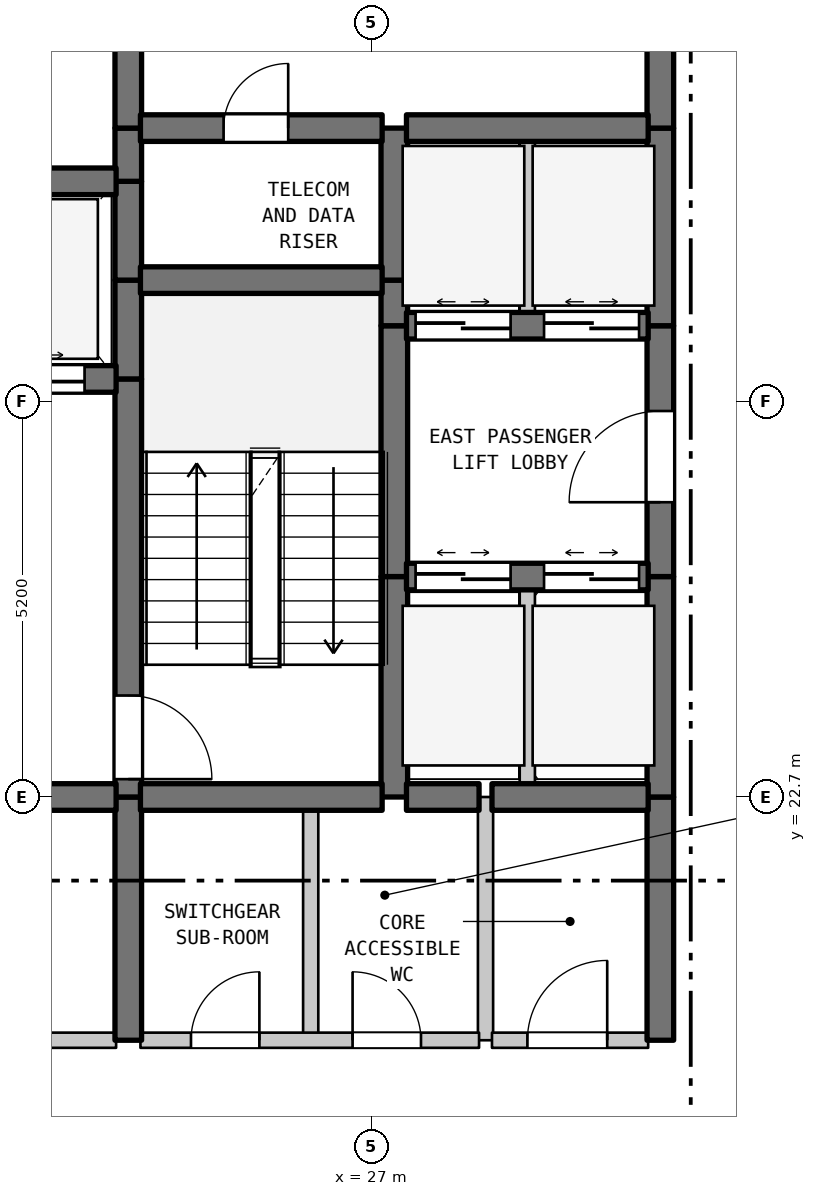
"""IFC4 building model, lengths in metres.
Left out: names, types, materials, properties, quantities, classifications, styles, units other than length and angle.
Written with IfcOpenShell. Run it as: python <this file> out.ifc"""

import sys

from ifc_helpers import new_model, si_unit, direction, frame, frame_2d, origin, place, context, subcontext, project, spatial, rectangle, extrude, element, fill, save


model = new_model("IFC4")
c1 = context("Model", 3, precision=1e-05, world=origin(), true_north=direction((0.0, 1.0)))
c2 = subcontext(c1, "Body", "Model", "MODEL_VIEW")
j1 = project(units=[si_unit("LENGTHUNIT", "METRE"), si_unit("PLANEANGLEUNIT", "RADIAN")], contexts=[c1])
p1 = place(None, origin())
s1 = spatial("IfcSite", under=j1, at=p1, CompositionType="ELEMENT")
p2 = place(p1, origin())
s2 = spatial("IfcBuilding", under=s1, at=p2, CompositionType="ELEMENT")
p3 = place(p2, frame((0.0, 0.0, 203.2)))
s3 = spatial("IfcBuildingStorey", under=s2, at=p3, CompositionType="ELEMENT", Elevation=203.2)
p4 = place(p3, frame((23.8, 19.5, 0.0), z_axis=(0.0, 0.0, 1.0), x_axis=(0.0, 1.0, 0.0)))
e1 = element("IfcWall", 1, at=p4, inside=s3, PredefinedType="SHEAR", context=c2, shape_type="SweptSolid", body=[
    extrude(rectangle(XDim=3.2, YDim=0.35, at=frame_2d((1.6, 0.0))), origin(), (0.0, 0.0, 1.0), 3.39),
])
p5 = place(p3, frame((23.8, 22.7, 0.0), z_axis=(0.0, 0.0, 1.0), x_axis=(0.0, 1.0, 0.0)))
e2 = element("IfcWall", 2, at=p5, inside=s3, PredefinedType="SHEAR", context=c2, shape_type="SweptSolid", body=[
    extrude(rectangle(XDim=5.5, YDim=0.35, at=frame_2d((2.75, 0.0))), origin(), (0.0, 0.0, 1.0), 3.39),
])
p6 = place(p5, frame((0.235, 0.0, 0.0)))
e3 = element("IfcOpeningElement", 3, at=p6, cuts=e2, PredefinedType="OPENING", context=c2, shape_type="SweptSolid", body=[
    extrude(rectangle(XDim=1.1, YDim=2.15, at=frame_2d((0.55, 1.075))), frame((0.0, 0.185, 0.0), z_axis=(0.0, -1.0, 0.0), x_axis=(1.0, 0.0, 0.0)), (0.0, 0.0, 1.0), 0.37),
])
for number, where, z_axis, x_axis in (
    (4, (23.8, 28.2, 0.0), (0.0, 0.0, 1.0), (0.0, 1.0, 0.0)),
    (5, (23.8, 29.5, 0.0), (0.0, 0.0, 1.0), (0.0, 1.0, 0.0)),
):
    element("IfcWall", number, at=place(p3, frame(where, z_axis=z_axis, x_axis=x_axis)), inside=s3, PredefinedType="SHEAR", context=c2, shape_type="SweptSolid", body=[
        extrude(rectangle(XDim=1.3, YDim=0.35, at=frame_2d((0.65, 0.0))), origin(), (0.0, 0.0, 1.0), 3.39),
    ])
p7 = place(p3, frame((23.8, 30.8, 0.0), z_axis=(0.0, 0.0, 1.0), x_axis=(0.0, 1.0, 0.0)))
e6 = element("IfcWall", 6, at=p7, inside=s3, PredefinedType="SHEAR", context=c2, shape_type="SweptSolid", body=[
    extrude(rectangle(XDim=0.7, YDim=0.35, at=frame_2d((0.35, 0.0))), origin(), (0.0, 0.0, 1.0), 3.39),
])
p8 = place(p3, frame((23.8, 31.5, 0.0), z_axis=(0.0, 0.0, 1.0), x_axis=(0.0, 1.0, 0.0)))
e7 = element("IfcWall", 7, at=p8, inside=s3, PredefinedType="SHEAR", context=c2, shape_type="SweptSolid", body=[
    extrude(rectangle(XDim=3.5, YDim=0.35, at=frame_2d((1.75, 0.0))), origin(), (0.0, 0.0, 1.0), 3.39),
])
p9 = place(p8, frame((1.127, 0.0, 0.0)))
e8 = element("IfcOpeningElement", 8, at=p9, cuts=e7, PredefinedType="OPENING", context=c2, shape_type="SweptSolid", body=[
    extrude(rectangle(XDim=1.1, YDim=2.15, at=frame_2d((0.55, 1.075))), frame((0.0, 0.185, 0.0), z_axis=(0.0, -1.0, 0.0), x_axis=(1.0, 0.0, 0.0)), (0.0, 0.0, 1.0), 0.37),
])
p10 = place(p3, frame((26.2, 19.5, 0.0), z_axis=(0.0, 0.0, 1.0), x_axis=(0.0, 1.0, 0.0)))
e9 = element("IfcWall", 9, at=p10, inside=s3, PredefinedType="STANDARD", context=c2, shape_type="SweptSolid", body=[
    extrude(rectangle(XDim=3.2, YDim=0.2, at=frame_2d((1.6, 0.0))), origin(), (0.0, 0.0, 1.0), 3.39),
])
p11 = place(p3, frame((27.3, 22.7, 0.0), z_axis=(0.0, 0.0, 1.0), x_axis=(0.0, 1.0, 0.0)))
e10 = element("IfcWall", 10, at=p11, inside=s3, PredefinedType="SHEAR", context=c2, shape_type="SweptSolid", body=[
    extrude(rectangle(XDim=2.9, YDim=0.35, at=frame_2d((1.45, 0.0))), origin(), (0.0, 0.0, 1.0), 3.39),
])
p12 = place(p3, frame((27.3, 25.6, 0.0), z_axis=(0.0, 0.0, 1.0), x_axis=(0.0, 1.0, 0.0)))
e11 = element("IfcWall", 11, at=p12, inside=s3, PredefinedType="SHEAR", context=c2, shape_type="SweptSolid", body=[
    extrude(rectangle(XDim=3.3, YDim=0.35, at=frame_2d((1.65, 0.0))), origin(), (0.0, 0.0, 1.0), 3.39),
])
p13 = place(p3, frame((27.3, 28.9, 0.0), z_axis=(0.0, 0.0, 1.0), x_axis=(0.0, 1.0, 0.0)))
e12 = element("IfcWall", 12, at=p13, inside=s3, PredefinedType="SHEAR", context=c2, shape_type="SweptSolid", body=[
    extrude(rectangle(XDim=0.6, YDim=0.35, at=frame_2d((0.3, 0.0))), origin(), (0.0, 0.0, 1.0), 3.39),
])
p14 = place(p3, frame((27.3, 29.5, 0.0), z_axis=(0.0, 0.0, 1.0), x_axis=(0.0, 1.0, 0.0)))
e13 = element("IfcWall", 13, at=p14, inside=s3, PredefinedType="SHEAR", context=c2, shape_type="SweptSolid", body=[
    extrude(rectangle(XDim=2.0, YDim=0.35, at=frame_2d((1.0, 0.0))), origin(), (0.0, 0.0, 1.0), 3.39),
])
p15 = place(p3, frame((28.5, 19.5, 0.0), z_axis=(0.0, 0.0, 1.0), x_axis=(0.0, 1.0, 0.0)))
e14 = element("IfcWall", 14, at=p15, inside=s3, PredefinedType="STANDARD", context=c2, shape_type="SweptSolid", body=[
    extrude(rectangle(XDim=3.2, YDim=0.2, at=frame_2d((1.6, 0.0))), origin(), (0.0, 0.0, 1.0), 3.39),
])
p16 = place(p3, frame((29.05, 22.7, 0.0), z_axis=(0.0, 0.0, 1.0), x_axis=(0.0, 1.0, 0.0)))
e15 = element("IfcWall", 15, at=p16, inside=s3, PredefinedType="STANDARD", context=c2, shape_type="SweptSolid", body=[
    extrude(rectangle(XDim=2.9, YDim=0.2, at=frame_2d((1.45, 0.0))), origin(), (0.0, 0.0, 1.0), 3.39),
])
p17 = place(p3, frame((29.05, 28.9, 0.0), z_axis=(0.0, 0.0, 1.0), x_axis=(0.0, 1.0, 0.0)))
e16 = element("IfcWall", 16, at=p17, inside=s3, PredefinedType="STANDARD", context=c2, shape_type="SweptSolid", body=[
    extrude(rectangle(XDim=2.6, YDim=0.2, at=frame_2d((1.3, 0.0))), origin(), (0.0, 0.0, 1.0), 3.39),
])
p18 = place(p3, frame((30.8, 19.5, 0.0), z_axis=(0.0, 0.0, 1.0), x_axis=(0.0, 1.0, 0.0)))
e17 = element("IfcWall", 17, at=p18, inside=s3, PredefinedType="SHEAR", context=c2, shape_type="SweptSolid", body=[
    extrude(rectangle(XDim=3.2, YDim=0.35, at=frame_2d((1.6, 0.0))), origin(), (0.0, 0.0, 1.0), 3.39),
])
p19 = place(p3, frame((30.8, 22.7, 0.0), z_axis=(0.0, 0.0, 1.0), x_axis=(0.0, 1.0, 0.0)))
e18 = element("IfcWall", 18, at=p19, inside=s3, PredefinedType="SHEAR", context=c2, shape_type="SweptSolid", body=[
    extrude(rectangle(XDim=2.9, YDim=0.35, at=frame_2d((1.45, 0.0))), origin(), (0.0, 0.0, 1.0), 3.39),
])
p20 = place(p3, frame((30.8, 25.6, 0.0), z_axis=(0.0, 0.0, 1.0), x_axis=(0.0, 1.0, 0.0)))
e19 = element("IfcWall", 19, at=p20, inside=s3, PredefinedType="SHEAR", context=c2, shape_type="SweptSolid", body=[
    extrude(rectangle(XDim=3.3, YDim=0.35, at=frame_2d((1.65, 0.0))), origin(), (0.0, 0.0, 1.0), 3.39),
])
p21 = place(p20, frame((0.978, 0.0, 0.0)))
e20 = element("IfcOpeningElement", 20, at=p21, cuts=e19, PredefinedType="OPENING", context=c2, shape_type="SweptSolid", body=[
    extrude(rectangle(XDim=1.2, YDim=2.2, at=frame_2d((0.6, 1.1))), frame((0.0, 0.185, 0.0), z_axis=(0.0, -1.0, 0.0), x_axis=(1.0, 0.0, 0.0)), (0.0, 0.0, 1.0), 0.37),
])
p22 = place(p3, frame((30.8, 28.9, 0.0), z_axis=(0.0, 0.0, 1.0), x_axis=(0.0, 1.0, 0.0)))
e21 = element("IfcWall", 21, at=p22, inside=s3, PredefinedType="SHEAR", context=c2, shape_type="SweptSolid", body=[
    extrude(rectangle(XDim=2.6, YDim=0.35, at=frame_2d((1.3, 0.0))), origin(), (0.0, 0.0, 1.0), 3.39),
])
p23 = place(p3, frame((30.8, 31.5, 0.0), z_axis=(0.0, 0.0, 1.0), x_axis=(0.0, 1.0, 0.0)))
e22 = element("IfcWall", 22, at=p23, inside=s3, PredefinedType="SHEAR", context=c2, shape_type="SweptSolid", body=[
    extrude(rectangle(XDim=3.5, YDim=0.35, at=frame_2d((1.75, 0.0))), origin(), (0.0, 0.0, 1.0), 3.39),
])
p24 = place(p23, frame((1.15, 0.0, 0.0)))
e23 = element("IfcOpeningElement", 23, at=p24, cuts=e22, PredefinedType="OPENING", context=c2, shape_type="SweptSolid", body=[
    extrude(rectangle(XDim=1.2, YDim=2.2, at=frame_2d((0.6, 1.1))), frame((0.0, 0.185, 0.0), z_axis=(0.0, -1.0, 0.0), x_axis=(1.0, 0.0, 0.0)), (0.0, 0.0, 1.0), 0.37),
])
p25 = place(p3, frame((19.16, 19.5, 0.0), z_axis=(0.0, 0.0, 1.0), x_axis=(1.0, 0.0, 0.0)))
e24 = element("IfcWall", 24, at=p25, inside=s3, PredefinedType="STANDARD", context=c2, shape_type="SweptSolid", body=[
    extrude(rectangle(XDim=4.48, YDim=0.2, at=frame_2d((2.24, 0.0))), origin(), (0.0, 0.0, 1.0), 3.39),
])
p26 = place(p25, frame((1.64, 0.0, 0.0)))
e25 = element("IfcOpeningElement", 25, at=p26, cuts=e24, PredefinedType="OPENING", context=c2, shape_type="SweptSolid", body=[
    extrude(rectangle(XDim=1.2, YDim=2.2, at=frame_2d((0.6, 1.1))), frame((0.0, 0.11, 0.0), z_axis=(0.0, -1.0, 0.0), x_axis=(1.0, 0.0, 0.0)), (0.0, 0.0, 1.0), 0.22),
])
p27 = place(p3, frame((23.96, 19.5, 0.0), z_axis=(0.0, 0.0, 1.0), x_axis=(1.0, 0.0, 0.0)))
e26 = element("IfcWall", 26, at=p27, inside=s3, PredefinedType="STANDARD", context=c2, shape_type="SweptSolid", body=[
    extrude(rectangle(XDim=4.455, YDim=0.2, at=frame_2d((2.228, 0.0))), origin(), (0.0, 0.0, 1.0), 3.39),
])
p28 = place(p27, frame((0.665, 0.0, 0.0)))
e27 = element("IfcOpeningElement", 27, at=p28, cuts=e26, PredefinedType="OPENING", context=c2, shape_type="SweptSolid", body=[
    extrude(rectangle(XDim=0.9, YDim=2.15, at=frame_2d((0.45, 1.075))), frame((0.0, 0.11, 0.0), z_axis=(0.0, -1.0, 0.0), x_axis=(1.0, 0.0, 0.0)), (0.0, 0.0, 1.0), 0.22),
])
p29 = place(p27, frame((2.791, 0.0, 0.0)))
e28 = element("IfcOpeningElement", 28, at=p29, cuts=e26, PredefinedType="OPENING", context=c2, shape_type="SweptSolid", body=[
    extrude(rectangle(XDim=0.9, YDim=2.15, at=frame_2d((0.45, 1.075))), frame((0.0, 0.11, 0.0), z_axis=(0.0, -1.0, 0.0), x_axis=(1.0, 0.0, 0.0)), (0.0, 0.0, 1.0), 0.22),
])
p30 = place(p3, frame((28.585, 19.5, 0.0), z_axis=(0.0, 0.0, 1.0), x_axis=(1.0, 0.0, 0.0)))
e29 = element("IfcWall", 29, at=p30, inside=s3, PredefinedType="STANDARD", context=c2, shape_type="SweptSolid", body=[
    extrude(rectangle(XDim=2.055, YDim=0.2, at=frame_2d((1.027, 0.0))), origin(), (0.0, 0.0, 1.0), 3.39),
])
p31 = place(p30, frame((0.466, 0.0, 0.0)))
e30 = element("IfcOpeningElement", 30, at=p31, cuts=e29, PredefinedType="OPENING", context=c2, shape_type="SweptSolid", body=[
    extrude(rectangle(XDim=1.05, YDim=2.15, at=frame_2d((0.525, 1.075))), frame((0.0, 0.11, 0.0), z_axis=(0.0, -1.0, 0.0), x_axis=(1.0, 0.0, 0.0)), (0.0, 0.0, 1.0), 0.22),
])
p32 = place(p3, frame((19.16, 22.7, 0.0), z_axis=(0.0, 0.0, 1.0), x_axis=(1.0, 0.0, 0.0)))
e31 = element("IfcWall", 31, at=p32, inside=s3, PredefinedType="SHEAR", context=c2, shape_type="SweptSolid", body=[
    extrude(rectangle(XDim=4.48, YDim=0.35, at=frame_2d((2.24, 0.0))), origin(), (0.0, 0.0, 1.0), 3.39),
])
p33 = place(p32, frame((1.64, 0.0, 0.0)))
e32 = element("IfcOpeningElement", 32, at=p33, cuts=e31, PredefinedType="OPENING", context=c2, shape_type="SweptSolid", body=[
    extrude(rectangle(XDim=1.2, YDim=2.2, at=frame_2d((0.6, 1.1))), frame((0.0, 0.185, 0.0), z_axis=(0.0, -1.0, 0.0), x_axis=(1.0, 0.0, 0.0)), (0.0, 0.0, 1.0), 0.37),
])
p34 = place(p3, frame((23.96, 22.7, 0.0), z_axis=(0.0, 0.0, 1.0), x_axis=(1.0, 0.0, 0.0)))
e33 = element("IfcWall", 33, at=p34, inside=s3, PredefinedType="SHEAR", context=c2, shape_type="SweptSolid", body=[
    extrude(rectangle(XDim=3.18, YDim=0.35, at=frame_2d((1.59, 0.0))), origin(), (0.0, 0.0, 1.0), 3.39),
])
p35 = place(p3, frame((27.46, 22.7, 0.0), z_axis=(0.0, 0.0, 1.0), x_axis=(1.0, 0.0, 0.0)))
e34 = element("IfcWall", 34, at=p35, inside=s3, PredefinedType="SHEAR", context=c2, shape_type="SweptSolid", body=[
    extrude(rectangle(XDim=0.955, YDim=0.35, at=frame_2d((0.478, 0.0))), origin(), (0.0, 0.0, 1.0), 3.39),
])
p36 = place(p3, frame((28.585, 22.7, 0.0), z_axis=(0.0, 0.0, 1.0), x_axis=(1.0, 0.0, 0.0)))
e35 = element("IfcWall", 35, at=p36, inside=s3, PredefinedType="SHEAR", context=c2, shape_type="SweptSolid", body=[
    extrude(rectangle(XDim=2.055, YDim=0.35, at=frame_2d((1.027, 0.0))), origin(), (0.0, 0.0, 1.0), 3.39),
])
p37 = place(p3, frame((27.46, 25.6, 0.0), z_axis=(0.0, 0.0, 1.0), x_axis=(1.0, 0.0, 0.0)))
e36 = element("IfcWall", 36, at=p37, inside=s3, PredefinedType="SHEAR", context=c2, shape_type="SweptSolid", body=[
    extrude(rectangle(XDim=3.18, YDim=0.35, at=frame_2d((1.59, 0.0))), origin(), (0.0, 0.0, 1.0), 3.39),
])
p38 = place(p37, frame((0.12, 0.0, 0.0)))
e37 = element("IfcOpeningElement", 37, at=p38, cuts=e36, PredefinedType="OPENING", context=c2, shape_type="SweptSolid", body=[
    extrude(rectangle(XDim=1.25, YDim=2.2, at=frame_2d((0.625, 1.1))), frame((0.0, 0.185, 0.0), z_axis=(0.0, -1.0, 0.0), x_axis=(1.0, 0.0, 0.0)), (0.0, 0.0, 1.0), 0.37),
])
p39 = place(p37, frame((1.81, 0.0, 0.0)))
e38 = element("IfcOpeningElement", 38, at=p39, cuts=e36, PredefinedType="OPENING", context=c2, shape_type="SweptSolid", body=[
    extrude(rectangle(XDim=1.25, YDim=2.2, at=frame_2d((0.625, 1.1))), frame((0.0, 0.185, 0.0), z_axis=(0.0, -1.0, 0.0), x_axis=(1.0, 0.0, 0.0)), (0.0, 0.0, 1.0), 0.37),
])
p40 = place(p3, frame((19.16, 28.2, 0.0), z_axis=(0.0, 0.0, 1.0), x_axis=(1.0, 0.0, 0.0)))
e39 = element("IfcWall", 39, at=p40, inside=s3, PredefinedType="SHEAR", context=c2, shape_type="SweptSolid", body=[
    extrude(rectangle(XDim=4.48, YDim=0.35, at=frame_2d((2.24, 0.0))), origin(), (0.0, 0.0, 1.0), 3.39),
])
p41 = place(p40, frame((0.415, 0.0, 0.0)))
e40 = element("IfcOpeningElement", 40, at=p41, cuts=e39, PredefinedType="OPENING", context=c2, shape_type="SweptSolid", body=[
    extrude(rectangle(XDim=1.25, YDim=2.2, at=frame_2d((0.625, 1.1))), frame((0.0, 0.185, 0.0), z_axis=(0.0, -1.0, 0.0), x_axis=(1.0, 0.0, 0.0)), (0.0, 0.0, 1.0), 0.37),
])
p42 = place(p40, frame((2.815, 0.0, 0.0)))
e41 = element("IfcOpeningElement", 41, at=p42, cuts=e39, PredefinedType="OPENING", context=c2, shape_type="SweptSolid", body=[
    extrude(rectangle(XDim=1.25, YDim=2.2, at=frame_2d((0.625, 1.1))), frame((0.0, 0.185, 0.0), z_axis=(0.0, -1.0, 0.0), x_axis=(1.0, 0.0, 0.0)), (0.0, 0.0, 1.0), 0.37),
])
p43 = place(p3, frame((27.46, 28.9, 0.0), z_axis=(0.0, 0.0, 1.0), x_axis=(1.0, 0.0, 0.0)))
e42 = element("IfcWall", 42, at=p43, inside=s3, PredefinedType="SHEAR", context=c2, shape_type="SweptSolid", body=[
    extrude(rectangle(XDim=3.18, YDim=0.35, at=frame_2d((1.59, 0.0))), origin(), (0.0, 0.0, 1.0), 3.39),
])
p44 = place(p43, frame((0.12, 0.0, 0.0)))
e43 = element("IfcOpeningElement", 43, at=p44, cuts=e42, PredefinedType="OPENING", context=c2, shape_type="SweptSolid", body=[
    extrude(rectangle(XDim=1.25, YDim=2.2, at=frame_2d((0.625, 1.1))), frame((0.0, 0.185, 0.0), z_axis=(0.0, -1.0, 0.0), x_axis=(1.0, 0.0, 0.0)), (0.0, 0.0, 1.0), 0.37),
])
p45 = place(p43, frame((1.81, 0.0, 0.0)))
e44 = element("IfcOpeningElement", 44, at=p45, cuts=e42, PredefinedType="OPENING", context=c2, shape_type="SweptSolid", body=[
    extrude(rectangle(XDim=1.25, YDim=2.2, at=frame_2d((0.625, 1.1))), frame((0.0, 0.185, 0.0), z_axis=(0.0, -1.0, 0.0), x_axis=(1.0, 0.0, 0.0)), (0.0, 0.0, 1.0), 0.37),
])
p46 = place(p3, frame((23.96, 29.5, 0.0), z_axis=(0.0, 0.0, 1.0), x_axis=(1.0, 0.0, 0.0)))
e45 = element("IfcWall", 45, at=p46, inside=s3, PredefinedType="SHEAR", context=c2, shape_type="SweptSolid", body=[
    extrude(rectangle(XDim=3.18, YDim=0.35, at=frame_2d((1.59, 0.0))), origin(), (0.0, 0.0, 1.0), 3.39),
])
p47 = place(p3, frame((19.16, 30.8, 0.0), z_axis=(0.0, 0.0, 1.0), x_axis=(1.0, 0.0, 0.0)))
e46 = element("IfcWall", 46, at=p47, inside=s3, PredefinedType="SHEAR", context=c2, shape_type="SweptSolid", body=[
    extrude(rectangle(XDim=4.48, YDim=0.35, at=frame_2d((2.24, 0.0))), origin(), (0.0, 0.0, 1.0), 3.39),
])
p48 = place(p3, frame((23.96, 31.5, 0.0), z_axis=(0.0, 0.0, 1.0), x_axis=(1.0, 0.0, 0.0)))
e47 = element("IfcWall", 47, at=p48, inside=s3, PredefinedType="SHEAR", context=c2, shape_type="SweptSolid", body=[
    extrude(rectangle(XDim=3.18, YDim=0.35, at=frame_2d((1.59, 0.0))), origin(), (0.0, 0.0, 1.0), 3.39),
])
p49 = place(p48, frame((1.094, 0.0, 0.0)))
e48 = element("IfcOpeningElement", 48, at=p49, cuts=e47, PredefinedType="OPENING", context=c2, shape_type="SweptSolid", body=[
    extrude(rectangle(XDim=0.85, YDim=2.1, at=frame_2d((0.425, 1.05))), frame((0.0, 0.185, 0.0), z_axis=(0.0, -1.0, 0.0), x_axis=(1.0, 0.0, 0.0)), (0.0, 0.0, 1.0), 0.37),
])
p50 = place(p3, frame((27.46, 31.5, 0.0), z_axis=(0.0, 0.0, 1.0), x_axis=(1.0, 0.0, 0.0)))
e49 = element("IfcWall", 49, at=p50, inside=s3, PredefinedType="SHEAR", context=c2, shape_type="SweptSolid", body=[
    extrude(rectangle(XDim=3.18, YDim=0.35, at=frame_2d((1.59, 0.0))), origin(), (0.0, 0.0, 1.0), 3.39),
])
p51 = place(p6, frame((1.1, 0.0, 0.0), z_axis=(0.0, 0.0, 1.0), x_axis=(-1.0, 0.0, 0.0)))
e50 = element("IfcDoor", 50, at=p51, inside=s3, OperationType="SINGLE_SWING_LEFT", PredefinedType="DOOR", context=c2, shape_type="SweptSolid", body=[
    extrude(rectangle(XDim=1.1, YDim=2.15, at=frame_2d((0.55, 1.075))), frame((0.0, 0.025, 0.0), z_axis=(0.0, -1.0, 0.0), x_axis=(1.0, 0.0, 0.0)), (0.0, 0.0, 1.0), 0.05),
])
fill(e3, e50)
p52 = place(p21, origin())
e51 = element("IfcDoor", 51, at=p52, inside=s3, OperationType="SINGLE_SWING_LEFT", PredefinedType="DOOR", context=c2, shape_type="SweptSolid", body=[
    extrude(rectangle(XDim=1.2, YDim=2.2, at=frame_2d((0.6, 1.1))), frame((0.0, 0.025, 0.0), z_axis=(0.0, -1.0, 0.0), x_axis=(1.0, 0.0, 0.0)), (0.0, 0.0, 1.0), 0.05),
])
fill(e20, e51)
p53 = place(p28, origin())
e52 = element("IfcDoor", 52, at=p53, inside=s3, OperationType="SINGLE_SWING_RIGHT", PredefinedType="DOOR", context=c2, shape_type="SweptSolid", body=[
    extrude(rectangle(XDim=0.9, YDim=2.15, at=frame_2d((0.45, 1.075))), frame((0.0, 0.025, 0.0), z_axis=(0.0, -1.0, 0.0), x_axis=(1.0, 0.0, 0.0)), (0.0, 0.0, 1.0), 0.05),
])
fill(e27, e52)
p54 = place(p29, origin())
e53 = element("IfcDoor", 53, at=p54, inside=s3, OperationType="SINGLE_SWING_LEFT", PredefinedType="DOOR", context=c2, shape_type="SweptSolid", body=[
    extrude(rectangle(XDim=0.9, YDim=2.15, at=frame_2d((0.45, 1.075))), frame((0.0, 0.025, 0.0), z_axis=(0.0, -1.0, 0.0), x_axis=(1.0, 0.0, 0.0)), (0.0, 0.0, 1.0), 0.05),
])
fill(e28, e53)
p55 = place(p31, origin())
e54 = element("IfcDoor", 54, at=p55, inside=s3, OperationType="SINGLE_SWING_RIGHT", PredefinedType="DOOR", context=c2, shape_type="SweptSolid", body=[
    extrude(rectangle(XDim=1.05, YDim=2.15, at=frame_2d((0.525, 1.075))), frame((0.0, 0.025, 0.0), z_axis=(0.0, -1.0, 0.0), x_axis=(1.0, 0.0, 0.0)), (0.0, 0.0, 1.0), 0.05),
])
fill(e30, e54)
p56 = place(p38, origin())
e55 = element("IfcDoor", 55, at=p56, inside=s3, OperationType="DOUBLE_DOOR_SLIDING", PredefinedType="DOOR", context=c2, shape_type="SweptSolid", body=[
    extrude(rectangle(XDim=1.25, YDim=2.2, at=frame_2d((0.625, 1.1))), frame((0.0, 0.025, 0.0), z_axis=(0.0, -1.0, 0.0), x_axis=(1.0, 0.0, 0.0)), (0.0, 0.0, 1.0), 0.05),
])
fill(e37, e55)
p57 = place(p39, origin())
e56 = element("IfcDoor", 56, at=p57, inside=s3, OperationType="DOUBLE_DOOR_SLIDING", PredefinedType="DOOR", context=c2, shape_type="SweptSolid", body=[
    extrude(rectangle(XDim=1.25, YDim=2.2, at=frame_2d((0.625, 1.1))), frame((0.0, 0.025, 0.0), z_axis=(0.0, -1.0, 0.0), x_axis=(1.0, 0.0, 0.0)), (0.0, 0.0, 1.0), 0.05),
])
fill(e38, e56)
p58 = place(p42, origin())
e57 = element("IfcDoor", 57, at=p58, inside=s3, OperationType="DOUBLE_DOOR_SLIDING", PredefinedType="DOOR", context=c2, shape_type="SweptSolid", body=[
    extrude(rectangle(XDim=1.25, YDim=2.2, at=frame_2d((0.625, 1.1))), frame((0.0, 0.025, 0.0), z_axis=(0.0, -1.0, 0.0), x_axis=(1.0, 0.0, 0.0)), (0.0, 0.0, 1.0), 0.05),
])
fill(e41, e57)
p59 = place(p44, origin())
e58 = element("IfcDoor", 58, at=p59, inside=s3, OperationType="DOUBLE_DOOR_SLIDING", PredefinedType="DOOR", context=c2, shape_type="SweptSolid", body=[
    extrude(rectangle(XDim=1.25, YDim=2.2, at=frame_2d((0.625, 1.1))), frame((0.0, 0.025, 0.0), z_axis=(0.0, -1.0, 0.0), x_axis=(1.0, 0.0, 0.0)), (0.0, 0.0, 1.0), 0.05),
])
fill(e43, e58)
p60 = place(p45, origin())
e59 = element("IfcDoor", 59, at=p60, inside=s3, OperationType="DOUBLE_DOOR_SLIDING", PredefinedType="DOOR", context=c2, shape_type="SweptSolid", body=[
    extrude(rectangle(XDim=1.25, YDim=2.2, at=frame_2d((0.625, 1.1))), frame((0.0, 0.025, 0.0), z_axis=(0.0, -1.0, 0.0), x_axis=(1.0, 0.0, 0.0)), (0.0, 0.0, 1.0), 0.05),
])
fill(e44, e59)
p61 = place(p49, origin())
e60 = element("IfcDoor", 60, at=p61, inside=s3, OperationType="SINGLE_SWING_RIGHT", PredefinedType="DOOR", context=c2, shape_type="SweptSolid", body=[
    extrude(rectangle(XDim=0.85, YDim=2.1, at=frame_2d((0.425, 1.05))), frame((0.0, 0.025, 0.0), z_axis=(0.0, -1.0, 0.0), x_axis=(1.0, 0.0, 0.0)), (0.0, 0.0, 1.0), 0.05),
])
fill(e48, e60)
save(model, sys.argv[1])
